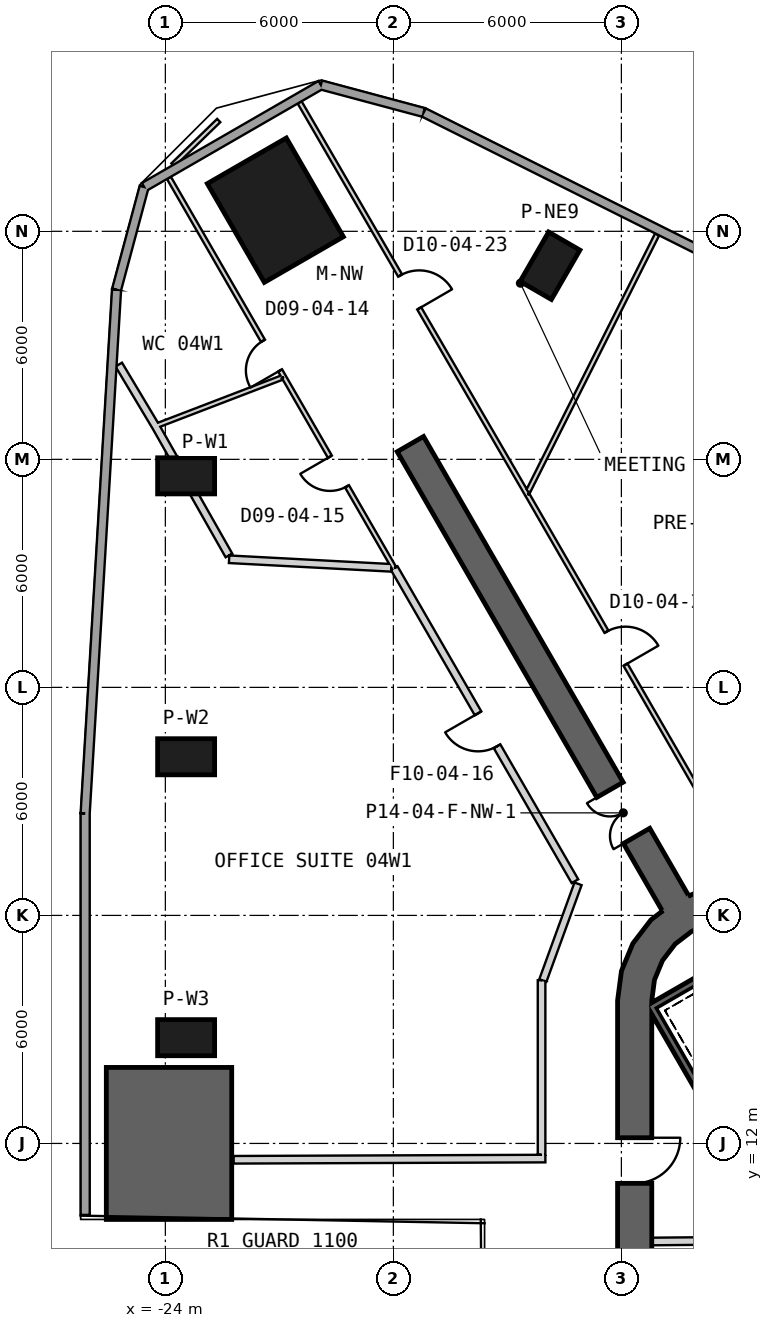
"""IFC4 building model, lengths in metres.
Left out: names, types, materials, properties, quantities, classifications, styles, units other than length and angle.
Written with IfcOpenShell. Run it as: python <this file> out.ifc"""

import sys

from ifc_helpers import new_model, si_unit, direction, frame, frame_2d, origin, origin_2d, place, context, subcontext, project, spatial, polyline, rectangle, outline, extrude, element, fill, save


model = new_model("IFC4")
c1 = context("Model", 3, precision=1e-05, world=origin(), true_north=direction((0.0, 1.0)))
c2 = subcontext(c1, "Body", "Model", "MODEL_VIEW")
j1 = project(units=[si_unit("LENGTHUNIT", "METRE"), si_unit("PLANEANGLEUNIT", "RADIAN")], contexts=[c1])
p1 = place(None, origin())
s1 = spatial("IfcSite", under=j1, at=p1, CompositionType="ELEMENT")
p2 = place(p1, origin())
s2 = spatial("IfcBuilding", under=s1, at=p2, CompositionType="ELEMENT")
p3 = place(p2, frame((0.0, 0.0, 27.5)))
s3 = spatial("IfcBuildingStorey", under=s2, at=p3, CompositionType="ELEMENT", Elevation=27.5)
p4 = place(p3, frame((-21.106, 36.556, 0.0), z_axis=(0.0, 0.0, 1.0), x_axis=(-0.5, 0.866025403784, 0.0)))
e1 = element("IfcColumn", 1, at=p4, inside=s3, PredefinedType="COLUMN", context=c2, shape_type="SweptSolid", body=[
    extrude(rectangle(XDim=3.0, YDim=2.4, at=origin_2d()), origin(), (0.0, 0.0, 1.0), 6.0),
])
for number, where, z_axis, x_axis in (
    (2, (-23.453, 29.566, 0.0), (0.0, 0.0, 1.0), (-1.0, 0.0, 0.0)),
    (3, (-23.453, 22.174, 0.0), (0.0, 0.0, 1.0), (-1.0, 0.0, 0.0)),
    (4, (-23.453, 14.783, 0.0), (0.0, 0.0, 1.0), (-1.0, 0.0, 0.0)),
    (5, (-13.878, 35.094, 0.0), (0.0, 0.0, 1.0), (0.5, 0.866, 0.0)),
):
    element("IfcColumn", number, at=place(p3, frame(where, z_axis=z_axis, x_axis=x_axis)), inside=s3, PredefinedType="COLUMN", context=c2, shape_type="SweptSolid", body=[
        extrude(rectangle(XDim=1.5, YDim=0.95, at=origin_2d()), origin(), (0.0, 0.0, 1.0), 6.0),
    ])
p5 = place(p3, frame((-11.65, 15.762, 0.0), z_axis=(0.0, 0.0, 1.0), x_axis=(0.0, -1.0, 0.0)))
e6 = element("IfcWall", 6, at=p5, inside=s3, PredefinedType="SHEAR", context=c2, shape_type="SweptSolid", body=[
    extrude(rectangle(XDim=31.523, YDim=0.9, at=frame_2d((15.762, 0.0))), origin(), (0.0, 0.0, 1.0), 6.0),
])
p6 = place(p5, frame((7.062, 0.0, 0.0)))
e7 = element("IfcOpeningElement", 7, at=p6, cuts=e6, PredefinedType="OPENING", context=c2, shape_type="SweptSolid", body=[
    extrude(rectangle(XDim=1.2, YDim=2.4, at=frame_2d((0.6, 1.2))), frame((0.0, 0.46, 0.0), z_axis=(0.0, -1.0, 0.0), x_axis=(1.0, 0.0, 0.0)), (0.0, 0.0, 1.0), 0.92),
])
p7 = place(p5, frame((9.762, 0.0, 0.0)))
e8 = element("IfcOpeningElement", 8, at=p7, cuts=e6, PredefinedType="OPENING", context=c2, shape_type="SweptSolid", body=[
    extrude(rectangle(XDim=1.2, YDim=2.4, at=frame_2d((0.6, 1.2))), frame((0.0, 0.46, 0.0), z_axis=(0.0, -1.0, 0.0), x_axis=(1.0, 0.0, 0.0)), (0.0, 0.0, 1.0), 0.92),
])
p8 = place(p5, frame((12.462, 0.0, 0.0)))
e9 = element("IfcOpeningElement", 9, at=p8, cuts=e6, PredefinedType="OPENING", context=c2, shape_type="SweptSolid", body=[
    extrude(rectangle(XDim=1.2, YDim=2.4, at=frame_2d((0.6, 1.2))), frame((0.0, 0.46, 0.0), z_axis=(0.0, -1.0, 0.0), x_axis=(1.0, 0.0, 0.0)), (0.0, 0.0, 1.0), 0.92),
])
p9 = place(p5, frame((15.162, 0.0, 0.0)))
e10 = element("IfcOpeningElement", 10, at=p9, cuts=e6, PredefinedType="OPENING", context=c2, shape_type="SweptSolid", body=[
    extrude(rectangle(XDim=1.2, YDim=2.4, at=frame_2d((0.6, 1.2))), frame((0.0, 0.46, 0.0), z_axis=(0.0, -1.0, 0.0), x_axis=(1.0, 0.0, 0.0)), (0.0, 0.0, 1.0), 0.92),
])
p10 = place(p5, frame((17.862, 0.0, 0.0)))
e11 = element("IfcOpeningElement", 11, at=p10, cuts=e6, PredefinedType="OPENING", context=c2, shape_type="SweptSolid", body=[
    extrude(rectangle(XDim=1.2, YDim=2.4, at=frame_2d((0.6, 1.2))), frame((0.0, 0.46, 0.0), z_axis=(0.0, -1.0, 0.0), x_axis=(1.0, 0.0, 0.0)), (0.0, 0.0, 1.0), 0.92),
])
p11 = place(p5, frame((20.562, 0.0, 0.0)))
e12 = element("IfcOpeningElement", 12, at=p11, cuts=e6, PredefinedType="OPENING", context=c2, shape_type="SweptSolid", body=[
    extrude(rectangle(XDim=1.2, YDim=2.4, at=frame_2d((0.6, 1.2))), frame((0.0, 0.46, 0.0), z_axis=(0.0, -1.0, 0.0), x_axis=(1.0, 0.0, 0.0)), (0.0, 0.0, 1.0), 0.92),
])
p12 = place(p5, frame((23.262, 0.0, 0.0)))
e13 = element("IfcOpeningElement", 13, at=p12, cuts=e6, PredefinedType="OPENING", context=c2, shape_type="SweptSolid", body=[
    extrude(rectangle(XDim=1.2, YDim=2.4, at=frame_2d((0.6, 1.2))), frame((0.0, 0.46, 0.0), z_axis=(0.0, -1.0, 0.0), x_axis=(1.0, 0.0, 0.0)), (0.0, 0.0, 1.0), 0.92),
])
p13 = place(p5, frame((3.612, 0.0, 0.0)))
e14 = element("IfcOpeningElement", 14, at=p13, cuts=e6, PredefinedType="OPENING", context=c2, shape_type="SweptSolid", body=[
    extrude(rectangle(XDim=1.2, YDim=2.4, at=frame_2d((0.6, 1.2))), frame((0.0, 0.46, 0.0), z_axis=(0.0, -1.0, 0.0), x_axis=(1.0, 0.0, 0.0)), (0.0, 0.0, 1.0), 0.92),
])
p14 = place(p5, frame((26.712, 0.0, 0.0)))
e15 = element("IfcOpeningElement", 15, at=p14, cuts=e6, PredefinedType="OPENING", context=c2, shape_type="SweptSolid", body=[
    extrude(rectangle(XDim=1.2, YDim=2.4, at=frame_2d((0.6, 1.2))), frame((0.0, 0.46, 0.0), z_axis=(0.0, -1.0, 0.0), x_axis=(1.0, 0.0, 0.0)), (0.0, 0.0, 1.0), 0.92),
])
p15 = place(p3, origin())
e16 = element("IfcWall", 16, at=p15, inside=s3, PredefinedType="SHEAR", context=c2, shape_type="SweptSolid", body=[
    extrude(outline(polyline([(-7.6, 18.36), (-8.323, 18.659), (-9.1, 18.762), (-9.876, 18.659), (-10.6, 18.36), (-11.221, 17.883), (-11.698, 17.262), (-11.998, 16.538), (-12.1, 15.762), (-11.2, 15.762), (-11.128, 16.305), (-10.919, 16.812), (-10.585, 17.247), (-10.15, 17.58), (-9.644, 17.79), (-9.1, 17.862), (-8.556, 17.79), (-8.05, 17.58), (-7.6, 18.36)])), origin(), (0.0, 0.0, 1.0), 6.0),
])
p16 = place(p3, frame((-10.575, 18.316, 0.0), z_axis=(0.0, 0.0, 1.0), x_axis=(-0.499996575515, 0.866027380903, 0.0)))
e17 = element("IfcWall", 17, at=p16, inside=s3, PredefinedType="SHEAR", context=c2, shape_type="SweptSolid", body=[
    extrude(rectangle(XDim=13.954, YDim=0.8, at=frame_2d((6.977, 0.0))), origin(), (0.0, 0.0, 1.0), 6.0),
])
p17 = place(p16, frame((2.05, 0.0, 0.0)))
e18 = element("IfcOpeningElement", 18, at=p17, cuts=e17, PredefinedType="OPENING", context=c2, shape_type="SweptSolid", body=[
    extrude(rectangle(XDim=1.4, YDim=2.4, at=frame_2d((0.7, 1.2))), frame((0.0, 0.41, 0.0), z_axis=(0.0, -1.0, 0.0), x_axis=(1.0, 0.0, 0.0)), (0.0, 0.0, 1.0), 0.82),
])
p18 = place(p3, origin())
e19 = element("IfcWall", 19, at=p18, inside=s3, PredefinedType="SHEAR", context=c2, shape_type="SweptSolid", body=[
    extrude(outline(polyline([(-25.553, 14.0), (-25.553, 10.0), (-22.253, 10.0), (-22.253, 14.0), (-25.553, 14.0)])), origin(), (0.0, 0.0, 1.0), 6.0),
])
p19 = place(p3, frame((-4.861, 32.952, 0.0), z_axis=(0.0, 0.0, 1.0), x_axis=(-0.894285628533, 0.447496608478, 0.0)))
e20 = element("IfcWall", 20, at=p19, inside=s3, PredefinedType="SOLIDWALL", context=c2, shape_type="SweptSolid", body=[
    extrude(rectangle(XDim=13.801, YDim=0.24, at=frame_2d((6.901, 0.0))), origin(), (0.0, 0.0, 1.0), 5.7),
])
p20 = place(p3, frame((-17.203, 39.128, 0.0), z_axis=(0.0, 0.0, 1.0), x_axis=(-0.965923146675, 0.25882904535, 0.0)))
e21 = element("IfcWall", 21, at=p20, inside=s3, PredefinedType="SOLIDWALL", context=c2, shape_type="SweptSolid", body=[
    extrude(rectangle(XDim=2.801, YDim=0.24, at=frame_2d((1.4, 0.0))), origin(), (0.0, 0.0, 1.0), 5.7),
])
p21 = place(p3, frame((-19.908, 39.853, 0.0), z_axis=(0.0, 0.0, 1.0), x_axis=(-0.866010734295, -0.500025407441, 0.0)))
e22 = element("IfcWall", 22, at=p21, inside=s3, PredefinedType="SOLIDWALL", context=c2, shape_type="SweptSolid", body=[
    extrude(rectangle(XDim=5.371, YDim=0.24, at=frame_2d((2.686, 0.0))), origin(), (0.0, 0.0, 1.0), 5.7),
])
p22 = place(p3, frame((-24.56, 37.167, 0.0), z_axis=(0.0, 0.0, 1.0), x_axis=(-0.258850842196, -0.965917305723, 0.0)))
e23 = element("IfcWall", 23, at=p22, inside=s3, PredefinedType="SOLIDWALL", context=c2, shape_type="SweptSolid", body=[
    extrude(rectangle(XDim=2.8, YDim=0.24, at=frame_2d((1.4, 0.0))), origin(), (0.0, 0.0, 1.0), 5.7),
])
p23 = place(p3, frame((-25.284, 34.462, 0.0), z_axis=(0.0, 0.0, 1.0), x_axis=(-0.059807686217, -0.998209918138, 0.0)))
e24 = element("IfcWall", 24, at=p23, inside=s3, PredefinedType="SOLIDWALL", context=c2, shape_type="SweptSolid", body=[
    extrude(rectangle(XDim=13.802, YDim=0.24, at=frame_2d((6.901, 0.0))), origin(), (0.0, 0.0, 1.0), 5.7),
])
p24 = place(p3, frame((-26.11, 20.685, 0.0), z_axis=(0.0, 0.0, 1.0), x_axis=(6.9319284e-05, -0.999999997597, 0.0)))
e25 = element("IfcWall", 25, at=p24, inside=s3, PredefinedType="SOLIDWALL", context=c2, shape_type="SweptSolid", body=[
    extrude(rectangle(XDim=10.566, YDim=0.24, at=frame_2d((5.283, 0.0))), origin(), (0.0, 0.0, 1.0), 5.7),
])
p25 = place(p3, frame((-11.2, 9.42, 0.0), z_axis=(0.0, 0.0, 1.0), x_axis=(0.999957167047, 0.009255488683, 0.0)))
e26 = element("IfcWall", 26, at=p25, inside=s3, PredefinedType="PLUMBINGWALL", context=c2, shape_type="SweptSolid", body=[
    extrude(rectangle(XDim=3.35, YDim=0.2, at=frame_2d((1.675, 0.0))), origin(), (0.0, 0.0, 1.0), 5.7),
])
p26 = place(p3, frame((-11.245, 15.678, -0.3), z_axis=(0.0, 0.0, 1.0), x_axis=(0.499977274689, -0.866038523851, 0.0)))
e27 = element("IfcWall", 27, at=p26, inside=s3, PredefinedType="SHEAR", context=c2, shape_type="SweptSolid", body=[
    extrude(rectangle(XDim=8.1, YDim=0.2, at=frame_2d((4.05, 0.0))), origin(), (0.0, 0.0, 1.0), 6.0),
])
p27 = place(p3, frame((-9.645, 16.486, -0.3), z_axis=(0.0, 0.0, 1.0), x_axis=(-0.866038843867, -0.499976720371, 0.0)))
e28 = element("IfcWall", 28, at=p27, inside=s3, PredefinedType="SHEAR", context=c2, shape_type="SweptSolid", body=[
    extrude(rectangle(XDim=1.69, YDim=0.2, at=frame_2d((0.845, 0.0))), origin(), (0.0, 0.0, 1.0), 6.0),
])
p28 = place(p3, frame((-17.977, 27.136, 0.0), z_axis=(0.0, 0.0, 1.0), x_axis=(-0.499995346943, 0.866028090212, 0.0)))
e29 = element("IfcWall", 29, at=p28, inside=s3, PredefinedType="PARTITIONING", context=c2, shape_type="SweptSolid", body=[
    extrude(rectangle(XDim=5.808, YDim=0.12, at=frame_2d((2.904, 0.0))), origin(), (0.0, 0.0, 1.0), 5.7),
])
p29 = place(p28, frame((2.487, 0.0, 0.0)))
e30 = element("IfcOpeningElement", 30, at=p29, cuts=e29, PredefinedType="OPENING", context=c2, shape_type="SweptSolid", body=[
    extrude(rectangle(XDim=0.9, YDim=2.1, at=frame_2d((0.45, 1.05))), frame((0.0, 0.07, 0.0), z_axis=(0.0, -1.0, 0.0), x_axis=(1.0, 0.0, 0.0)), (0.0, 0.0, 1.0), 0.14),
])
p30 = place(p3, frame((-20.881, 32.166, 0.0), z_axis=(0.0, 0.0, 1.0), x_axis=(-0.499997231551, 0.866027002143, 0.0)))
e31 = element("IfcWall", 31, at=p30, inside=s3, PredefinedType="PARTITIONING", context=c2, shape_type="SweptSolid", body=[
    extrude(rectangle(XDim=6.05, YDim=0.12, at=frame_2d((3.025, 0.0))), origin(), (0.0, 0.0, 1.0), 5.7),
])
p31 = place(p30, frame((0.2, 0.0, 0.0)))
e32 = element("IfcOpeningElement", 32, at=p31, cuts=e31, PredefinedType="OPENING", context=c2, shape_type="SweptSolid", body=[
    extrude(rectangle(XDim=0.9, YDim=2.1, at=frame_2d((0.45, 1.05))), frame((0.0, 0.07, 0.0), z_axis=(0.0, -1.0, 0.0), x_axis=(1.0, 0.0, 0.0)), (0.0, 0.0, 1.0), 0.14),
])
p32 = place(p3, frame((-22.595, 38.915, 0.0), z_axis=(0.0, 0.0, 1.0), x_axis=(-0.717273158196, -0.696792089888, 0.0)))
e33 = element("IfcWall", 33, at=p32, inside=s3, PredefinedType="PARTITIONING", context=c2, shape_type="SweptSolid", body=[
    extrude(rectangle(XDim=1.681, YDim=0.12, at=frame_2d((0.84, 0.0))), origin(), (0.0, 0.0, 1.0), 5.7),
])
p33 = place(p3, frame((-14.0, 11.602, 0.0), z_axis=(0.0, 0.0, 1.0), x_axis=(-0.999992515765, -0.003868903516, 0.0)))
e34 = element("IfcWall", 34, at=p33, inside=s3, PredefinedType="PARTITIONING", context=c2, shape_type="SweptSolid", body=[
    extrude(rectangle(XDim=8.203, YDim=0.2, at=frame_2d((4.102, 0.0))), origin(), (0.0, 0.0, 1.0), 5.17),
])
p34 = place(p3, frame((-14.1, 16.294, 0.0), z_axis=(0.0, 0.0, 1.0), x_axis=(0.0, -1.0, 0.0)))
e35 = element("IfcWall", 35, at=p34, inside=s3, PredefinedType="PARTITIONING", context=c2, shape_type="SweptSolid", body=[
    extrude(rectangle(XDim=4.592, YDim=0.2, at=frame_2d((2.296, 0.0))), origin(), (0.0, 0.0, 1.0), 4.88),
])
p35 = place(p3, frame((-13.14, 18.831, 0.0), z_axis=(0.0, 0.0, 1.0), x_axis=(-0.34195308529, -0.939717025205, 0.0)))
e36 = element("IfcWall", 36, at=p35, inside=s3, PredefinedType="PARTITIONING", context=c2, shape_type="SweptSolid", body=[
    extrude(rectangle(XDim=2.707, YDim=0.2, at=frame_2d((1.353, 0.0))), origin(), (0.0, 0.0, 1.0), 4.78),
])
p36 = place(p3, frame((-13.222, 18.9, 0.0), z_axis=(0.0, 0.0, 1.0), x_axis=(-0.499993569446, 0.866029116435, 0.0)))
e37 = element("IfcWall", 37, at=p36, inside=s3, PredefinedType="PARTITIONING", context=c2, shape_type="SweptSolid", body=[
    extrude(rectangle(XDim=9.51, YDim=0.2, at=frame_2d((4.755, 0.0))), origin(), (0.0, 0.0, 1.0), 5.7),
])
p37 = place(p36, frame((4.1, 0.0, 0.0)))
e38 = element("IfcOpeningElement", 38, at=p37, cuts=e37, PredefinedType="OPENING", context=c2, shape_type="SweptSolid", body=[
    extrude(rectangle(XDim=1.0, YDim=2.1, at=frame_2d((0.5, 1.05))), frame((0.0, 0.11, 0.0), z_axis=(0.0, -1.0, 0.0), x_axis=(1.0, 0.0, 0.0)), (0.0, 0.0, 1.0), 0.22),
])
p38 = place(p3, frame((-20.939, 32.148, 0.0), z_axis=(0.0, 0.0, 1.0), x_axis=(-0.933648957611, -0.358189368841, 0.0)))
e39 = element("IfcWall", 39, at=p38, inside=s3, PredefinedType="PARTITIONING", context=c2, shape_type="SweptSolid", body=[
    extrude(rectangle(XDim=3.584, YDim=0.12, at=frame_2d((1.792, 0.0))), origin(), (0.0, 0.0, 1.0), 5.7),
])
p39 = place(p3, frame((-24.243, 30.85, 0.0), z_axis=(0.0, 0.0, 1.0), x_axis=(-0.513501792003, 0.858088520847, 0.0)))
e40 = element("IfcWall", 40, at=p39, inside=s3, PredefinedType="PARTITIONING", context=c2, shape_type="SweptSolid", body=[
    extrude(rectangle(XDim=1.915, YDim=0.2, at=frame_2d((0.958, 0.0))), origin(), (0.0, 0.0, 1.0), 5.7),
])
p40 = place(p3, frame((-18.051, 27.145, 0.0), z_axis=(0.0, 0.0, 1.0), x_axis=(-0.998602334655, 0.052852409802, 0.0)))
e41 = element("IfcWall", 41, at=p40, inside=s3, PredefinedType="PARTITIONING", context=c2, shape_type="SweptSolid", body=[
    extrude(rectangle(XDim=4.277, YDim=0.2, at=frame_2d((2.139, 0.0))), origin(), (0.0, 0.0, 1.0), 4.78),
])
p41 = place(p3, frame((-22.326, 27.471, 0.0), z_axis=(0.0, 0.0, 1.0), x_axis=(-0.493442320744, 0.869778521291, 0.0)))
e42 = element("IfcWall", 42, at=p41, inside=s3, PredefinedType="PARTITIONING", context=c2, shape_type="SweptSolid", body=[
    extrude(rectangle(XDim=3.884, YDim=0.2, at=frame_2d((1.942, 0.0))), origin(), (0.0, 0.0, 1.0), 4.78),
])
p42 = place(p3, frame((-14.474, 29.069, 0.0), z_axis=(0.0, 0.0, 1.0), x_axis=(0.500007429105, -0.866021114546, 0.0)))
e43 = element("IfcWall", 43, at=p42, inside=s3, PredefinedType="PARTITIONING", context=c2, shape_type="SweptSolid", body=[
    extrude(rectangle(XDim=9.591, YDim=0.12, at=frame_2d((4.795, 0.0))), origin(), (0.0, 0.0, 1.0), 5.7),
])
p43 = place(p42, frame((4.164, 0.0, 0.0)))
e44 = element("IfcOpeningElement", 44, at=p43, cuts=e43, PredefinedType="OPENING", context=c2, shape_type="SweptSolid", body=[
    extrude(rectangle(XDim=1.0, YDim=2.1, at=frame_2d((0.5, 1.05))), frame((0.0, 0.07, 0.0), z_axis=(0.0, -1.0, 0.0), x_axis=(1.0, 0.0, 0.0)), (0.0, 0.0, 1.0), 0.14),
])
p44 = place(p3, frame((-20.466, 39.392, 0.0), z_axis=(0.0, 0.0, 1.0), x_axis=(0.50207038067, -0.86482676465, 0.0)))
e45 = element("IfcWall", 45, at=p44, inside=s3, PredefinedType="PARTITIONING", context=c2, shape_type="SweptSolid", body=[
    extrude(rectangle(XDim=11.936, YDim=0.12, at=frame_2d((5.968, 0.0))), origin(), (0.0, 0.0, 1.0), 5.7),
])
p45 = place(p44, frame((5.267, 0.0, 0.0)))
e46 = element("IfcOpeningElement", 46, at=p45, cuts=e45, PredefinedType="OPENING", context=c2, shape_type="SweptSolid", body=[
    extrude(rectangle(XDim=1.0, YDim=2.1, at=frame_2d((0.5, 1.05))), frame((0.0, 0.07, 0.0), z_axis=(0.0, -1.0, 0.0), x_axis=(1.0, 0.0, 0.0)), (0.0, 0.0, 1.0), 0.14),
])
p46 = place(p3, frame((-11.061, 35.915, 0.0), z_axis=(0.0, 0.0, 1.0), x_axis=(-0.448736604458, -0.893664064299, 0.0)))
e47 = element("IfcWall", 47, at=p46, inside=s3, PredefinedType="PARTITIONING", context=c2, shape_type="SweptSolid", body=[
    extrude(rectangle(XDim=7.563, YDim=0.12, at=frame_2d((3.781, 0.0))), origin(), (0.0, 0.0, 1.0), 4.78),
])
p47 = place(p31, origin())
e48 = element("IfcDoor", 48, at=p47, inside=s3, OperationType="SINGLE_SWING_LEFT", PredefinedType="NOTDEFINED", context=c2, shape_type="SweptSolid", body=[
    extrude(rectangle(XDim=0.9, YDim=2.1, at=frame_2d((0.45, 1.05))), frame((0.0, 0.025, 0.0), z_axis=(0.0, -1.0, 0.0), x_axis=(1.0, 0.0, 0.0)), (0.0, 0.0, 1.0), 0.05),
])
fill(e32, e48)
p48 = place(p29, origin())
e49 = element("IfcDoor", 49, at=p48, inside=s3, OperationType="SINGLE_SWING_RIGHT", PredefinedType="NOTDEFINED", context=c2, shape_type="SweptSolid", body=[
    extrude(rectangle(XDim=0.9, YDim=2.1, at=frame_2d((0.45, 1.05))), frame((0.0, 0.025, 0.0), z_axis=(0.0, -1.0, 0.0), x_axis=(1.0, 0.0, 0.0)), (0.0, 0.0, 1.0), 0.05),
])
fill(e30, e49)
p49 = place(p37, origin())
e50 = element("IfcDoor", 50, at=p49, inside=s3, OperationType="SINGLE_SWING_RIGHT", PredefinedType="USERDEFINED", context=c2, shape_type="SweptSolid", body=[
    extrude(rectangle(XDim=1.0, YDim=2.1, at=frame_2d((0.5, 1.05))), frame((0.0, 0.025, 0.0), z_axis=(0.0, -1.0, 0.0), x_axis=(1.0, 0.0, 0.0)), (0.0, 0.0, 1.0), 0.05),
])
fill(e38, e50)
p50 = place(p43, origin())
e51 = element("IfcDoor", 51, at=p50, inside=s3, OperationType="SINGLE_SWING_RIGHT", PredefinedType="NOTDEFINED", context=c2, shape_type="SweptSolid", body=[
    extrude(rectangle(XDim=1.0, YDim=2.1, at=frame_2d((0.5, 1.05))), frame((0.0, 0.025, 0.0), z_axis=(0.0, -1.0, 0.0), x_axis=(1.0, 0.0, 0.0)), (0.0, 0.0, 1.0), 0.05),
])
fill(e44, e51)
p51 = place(p45, origin())
e52 = element("IfcDoor", 52, at=p51, inside=s3, OperationType="SINGLE_SWING_RIGHT", PredefinedType="NOTDEFINED", context=c2, shape_type="SweptSolid", body=[
    extrude(rectangle(XDim=1.0, YDim=2.1, at=frame_2d((0.5, 1.05))), frame((0.0, 0.025, 0.0), z_axis=(0.0, -1.0, 0.0), x_axis=(1.0, 0.0, 0.0)), (0.0, 0.0, 1.0), 0.05),
])
fill(e46, e52)
p52 = place(p13, origin())
e53 = element("IfcDoor", 53, at=p52, inside=s3, OperationType="SINGLE_SWING_LEFT", PredefinedType="USERDEFINED", context=c2, shape_type="SweptSolid", body=[
    extrude(rectangle(XDim=1.2, YDim=2.4, at=frame_2d((0.6, 1.2))), frame((0.0, 0.025, 0.0), z_axis=(0.0, -1.0, 0.0), x_axis=(1.0, 0.0, 0.0)), (0.0, 0.0, 1.0), 0.05),
])
fill(e14, e53)
p53 = place(p17, origin())
e54 = element("IfcDoor", 54, at=p53, inside=s3, OperationType="DOUBLE_DOOR_SINGLE_SWING", PredefinedType="NOTDEFINED", context=c2, shape_type="SweptSolid", body=[
    extrude(rectangle(XDim=1.4, YDim=2.4, at=frame_2d((0.7, 1.2))), frame((0.0, 0.025, 0.0), z_axis=(0.0, -1.0, 0.0), x_axis=(1.0, 0.0, 0.0)), (0.0, 0.0, 1.0), 0.05),
])
fill(e18, e54)
save(model, sys.argv[1])
